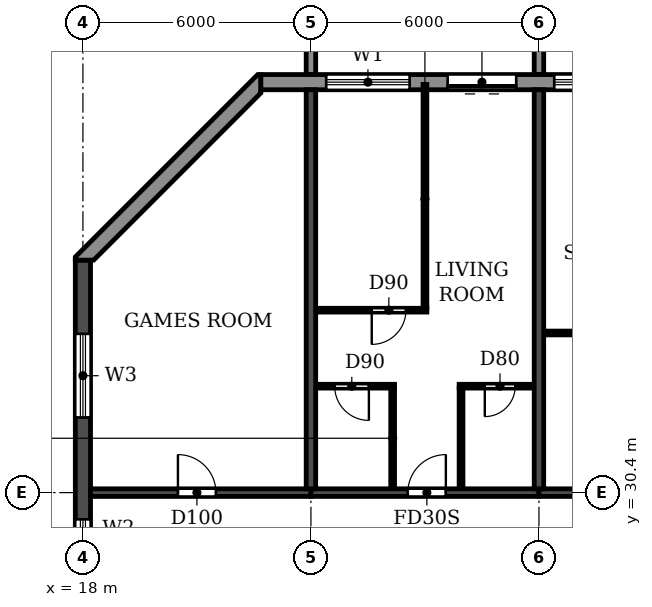
"""IFC4 building model, lengths in metres.
Left out: names, types, materials, properties, quantities, classifications, styles, units other than length and angle.
Written with IfcOpenShell. Run it as: python <this file> out.ifc"""

import sys

from ifc_helpers import new_model, si_unit, direction, frame, frame_2d, origin, place, context, subcontext, project, spatial, polyline, rectangle, outline, extrude, source, transform, mapped, element, fill, save


model = new_model("IFC4")
c1 = context("Model", 3, precision=1e-05, world=origin(), true_north=direction((0.0, 1.0)))
c2 = subcontext(c1, "Body", "Model", "MODEL_VIEW")
j1 = project(units=[si_unit("LENGTHUNIT", "METRE"), si_unit("PLANEANGLEUNIT", "RADIAN")], contexts=[c1])
p1 = place(None, origin())
s1 = spatial("IfcSite", under=j1, at=p1, CompositionType="ELEMENT")
p2 = place(p1, origin())
s2 = spatial("IfcBuilding", under=s1, at=p2, CompositionType="ELEMENT")
p3 = place(p2, frame((0.0, 0.0, 201.6)))
s3 = spatial("IfcBuildingStorey", under=s2, at=p3, CompositionType="ELEMENT", Elevation=201.6)
for number, where, z_axis, x_axis in (
    (1, (24.0, 30.5, 0.0), (0.0, 0.0, 1.0), (0.0, 1.0, 0.0)),
    (2, (30.0, 30.5, 0.0), (0.0, 0.0, 1.0), (0.0, 1.0, 0.0)),
):
    element("IfcWall", number, at=place(p3, frame(where, z_axis=z_axis, x_axis=x_axis)), inside=s3, PredefinedType="SHEAR", context=c2, shape_type="SweptSolid", body=[
        extrude(rectangle(XDim=10.5, YDim=0.25, at=frame_2d((5.25, 0.0))), origin(), (0.0, 0.0, 1.0), 3.08),
    ])
p4 = place(p3, frame((18.0, 4.683, 0.0), z_axis=(0.0, 0.0, 1.0), x_axis=(0.0, 1.0, 0.0)))
e3 = element("IfcWall", 3, at=p4, inside=s3, PredefinedType="SHEAR", context=c2, shape_type="SweptSolid", body=[
    extrude(rectangle(XDim=31.834, YDim=0.4, at=frame_2d((15.917, 0.0))), origin(), (0.0, 0.0, 1.0), 3.08),
])
p5 = place(p4, frame((23.817, 0.0, 0.9)))
e4 = element("IfcOpeningElement", 4, at=p5, cuts=e3, PredefinedType="OPENING", context=c2, shape_type="SweptSolid", body=[
    extrude(rectangle(XDim=1.2, YDim=1.5, at=frame_2d((0.6, 0.75))), frame((0.0, 0.21, 0.0), z_axis=(0.0, -1.0, 0.0), x_axis=(1.0, 0.0, 0.0)), (0.0, 0.0, 1.0), 0.42),
])
p6 = place(p4, frame((8.017, 0.0, 0.9)))
e5 = element("IfcOpeningElement", 5, at=p6, cuts=e3, PredefinedType="OPENING", context=c2, shape_type="SweptSolid", body=[
    extrude(rectangle(XDim=1.2, YDim=1.5, at=frame_2d((0.6, 0.75))), frame((0.0, 0.21, 0.0), z_axis=(0.0, -1.0, 0.0), x_axis=(1.0, 0.0, 0.0)), (0.0, 0.0, 1.0), 0.42),
])
p7 = place(p4, frame((27.694, 0.0, 0.6)))
e6 = element("IfcOpeningElement", 6, at=p7, cuts=e3, PredefinedType="OPENING", context=c2, shape_type="SweptSolid", body=[
    extrude(rectangle(XDim=2.2, YDim=1.8, at=frame_2d((1.1, 0.9))), frame((0.0, 0.21, 0.0), z_axis=(0.0, -1.0, 0.0), x_axis=(1.0, 0.0, 0.0)), (0.0, 0.0, 1.0), 0.42),
])
p8 = place(p4, frame((2.541, 0.0, 0.6)))
e7 = element("IfcOpeningElement", 7, at=p8, cuts=e3, PredefinedType="OPENING", context=c2, shape_type="SweptSolid", body=[
    extrude(rectangle(XDim=2.2, YDim=1.8, at=frame_2d((1.1, 0.9))), frame((0.0, 0.21, 0.0), z_axis=(0.0, -1.0, 0.0), x_axis=(1.0, 0.0, 0.0)), (0.0, 0.0, 1.0), 0.42),
])
p9 = place(p4, frame((15.917, 0.0, 0.9)))
e8 = element("IfcOpeningElement", 8, at=p9, cuts=e3, PredefinedType="OPENING", context=c2, shape_type="SweptSolid", body=[
    extrude(rectangle(XDim=1.2, YDim=1.5, at=frame_2d((0.6, 0.75))), frame((0.0, 0.21, 0.0), z_axis=(0.0, -1.0, 0.0), x_axis=(1.0, 0.0, 0.0)), (0.0, 0.0, 1.0), 0.42),
])
p10 = place(p3, frame((18.2, 30.4, 0.0), z_axis=(0.0, 0.0, 1.0), x_axis=(1.0, 0.0, 0.0)))
e9 = element("IfcWall", 9, at=p10, inside=s3, PredefinedType="SHEAR", context=c2, shape_type="SweptSolid", body=[
    extrude(rectangle(XDim=5.8, YDim=0.2, at=frame_2d((2.9, 0.0))), origin(), (0.0, 0.0, 1.0), 2.48),
])
p11 = place(p10, frame((2.3, 0.0, 0.0)))
e10 = element("IfcOpeningElement", 10, at=p11, cuts=e9, PredefinedType="OPENING", context=c2, shape_type="SweptSolid", body=[
    extrude(rectangle(XDim=1.0, YDim=2.1, at=frame_2d((0.5, 1.05))), frame((0.0, 0.11, 0.0), z_axis=(0.0, -1.0, 0.0), x_axis=(1.0, 0.0, 0.0)), (0.0, 0.0, 1.0), 0.22),
])
p12 = place(p3, frame((24.0, 30.4, 0.0), z_axis=(0.0, 0.0, 1.0), x_axis=(1.0, 0.0, 0.0)))
e11 = element("IfcWall", 11, at=p12, inside=s3, PredefinedType="SHEAR", context=c2, shape_type="SweptSolid", body=[
    extrude(rectangle(XDim=6.0, YDim=0.2, at=frame_2d((3.0, 0.0))), origin(), (0.0, 0.0, 1.0), 2.48),
])
p13 = place(p12, frame((2.55, 0.0, 0.0)))
e12 = element("IfcOpeningElement", 12, at=p13, cuts=e11, PredefinedType="OPENING", context=c2, shape_type="SweptSolid", body=[
    extrude(rectangle(XDim=1.0, YDim=2.1, at=frame_2d((0.5, 1.05))), frame((0.0, 0.11, 0.0), z_axis=(0.0, -1.0, 0.0), x_axis=(1.0, 0.0, 0.0)), (0.0, 0.0, 1.0), 0.22),
])
p14 = place(p3, frame((30.0, 30.4, 0.0), z_axis=(0.0, 0.0, 1.0), x_axis=(1.0, 0.0, 0.0)))
e13 = element("IfcWall", 13, at=p14, inside=s3, PredefinedType="SHEAR", context=c2, shape_type="SweptSolid", body=[
    extrude(rectangle(XDim=6.0, YDim=0.2, at=frame_2d((3.0, 0.0))), origin(), (0.0, 0.0, 1.0), 2.48),
])
p15 = place(p14, frame((2.45, 0.0, 0.0)))
e14 = element("IfcOpeningElement", 14, at=p15, cuts=e13, PredefinedType="OPENING", context=c2, shape_type="SweptSolid", body=[
    extrude(rectangle(XDim=1.0, YDim=2.1, at=frame_2d((0.5, 1.05))), frame((0.0, 0.11, 0.0), z_axis=(0.0, -1.0, 0.0), x_axis=(1.0, 0.0, 0.0)), (0.0, 0.0, 1.0), 0.22),
])
p16 = place(p3, frame((79.317, 41.2, 0.0), z_axis=(0.0, 0.0, 1.0), x_axis=(-1.0, 0.0, 0.0)))
e15 = element("IfcWall", 15, at=p16, inside=s3, PredefinedType="STANDARD", context=c2, shape_type="SweptSolid", body=[
    extrude(rectangle(XDim=56.634, YDim=0.4, at=frame_2d((28.317, 0.0))), origin(), (0.0, 0.0, 1.0), 3.08),
])
p17 = place(p16, frame((52.717, 0.0, 0.9)))
e16 = element("IfcOpeningElement", 16, at=p17, cuts=e15, PredefinedType="OPENING", context=c2, shape_type="SweptSolid", body=[
    extrude(rectangle(XDim=2.2, YDim=1.5, at=frame_2d((1.1, 0.75))), frame((0.0, 0.21, 0.0), z_axis=(0.0, -1.0, 0.0), x_axis=(1.0, 0.0, 0.0)), (0.0, 0.0, 1.0), 0.42),
])
p18 = place(p16, frame((49.917, 0.0, 0.0)))
e17 = element("IfcOpeningElement", 17, at=p18, cuts=e15, PredefinedType="OPENING", context=c2, shape_type="SweptSolid", body=[
    extrude(rectangle(XDim=1.8, YDim=2.4, at=frame_2d((0.9, 1.2))), frame((0.0, 0.21, 0.0), z_axis=(0.0, -1.0, 0.0), x_axis=(1.0, 0.0, 0.0)), (0.0, 0.0, 1.0), 0.42),
])
p19 = place(p16, frame((46.717, 0.0, 0.9)))
e18 = element("IfcOpeningElement", 18, at=p19, cuts=e15, PredefinedType="OPENING", context=c2, shape_type="SweptSolid", body=[
    extrude(rectangle(XDim=2.2, YDim=1.5, at=frame_2d((1.1, 0.75))), frame((0.0, 0.21, 0.0), z_axis=(0.0, -1.0, 0.0), x_axis=(1.0, 0.0, 0.0)), (0.0, 0.0, 1.0), 0.42),
])
p20 = place(p16, frame((43.917, 0.0, 0.0)))
e19 = element("IfcOpeningElement", 19, at=p20, cuts=e15, PredefinedType="OPENING", context=c2, shape_type="SweptSolid", body=[
    extrude(rectangle(XDim=1.8, YDim=2.4, at=frame_2d((0.9, 1.2))), frame((0.0, 0.21, 0.0), z_axis=(0.0, -1.0, 0.0), x_axis=(1.0, 0.0, 0.0)), (0.0, 0.0, 1.0), 0.42),
])
p21 = place(p16, frame((40.917, 0.0, 0.0)))
e20 = element("IfcOpeningElement", 20, at=p21, cuts=e15, PredefinedType="OPENING", context=c2, shape_type="SweptSolid", body=[
    extrude(rectangle(XDim=1.8, YDim=2.4, at=frame_2d((0.9, 1.2))), frame((0.0, 0.21, 0.0), z_axis=(0.0, -1.0, 0.0), x_axis=(1.0, 0.0, 0.0)), (0.0, 0.0, 1.0), 0.42),
])
p22 = place(p16, frame((37.717, 0.0, 0.9)))
e21 = element("IfcOpeningElement", 21, at=p22, cuts=e15, PredefinedType="OPENING", context=c2, shape_type="SweptSolid", body=[
    extrude(rectangle(XDim=2.2, YDim=1.5, at=frame_2d((1.1, 0.75))), frame((0.0, 0.21, 0.0), z_axis=(0.0, -1.0, 0.0), x_axis=(1.0, 0.0, 0.0)), (0.0, 0.0, 1.0), 0.42),
])
p23 = place(p16, frame((34.717, 0.0, 0.9)))
e22 = element("IfcOpeningElement", 22, at=p23, cuts=e15, PredefinedType="OPENING", context=c2, shape_type="SweptSolid", body=[
    extrude(rectangle(XDim=2.2, YDim=1.5, at=frame_2d((1.1, 0.75))), frame((0.0, 0.21, 0.0), z_axis=(0.0, -1.0, 0.0), x_axis=(1.0, 0.0, 0.0)), (0.0, 0.0, 1.0), 0.42),
])
p24 = place(p16, frame((31.717, 0.0, 0.9)))
e23 = element("IfcOpeningElement", 23, at=p24, cuts=e15, PredefinedType="OPENING", context=c2, shape_type="SweptSolid", body=[
    extrude(rectangle(XDim=2.2, YDim=1.5, at=frame_2d((1.1, 0.75))), frame((0.0, 0.21, 0.0), z_axis=(0.0, -1.0, 0.0), x_axis=(1.0, 0.0, 0.0)), (0.0, 0.0, 1.0), 0.42),
])
p25 = place(p16, frame((28.717, 0.0, 0.9)))
e24 = element("IfcOpeningElement", 24, at=p25, cuts=e15, PredefinedType="OPENING", context=c2, shape_type="SweptSolid", body=[
    extrude(rectangle(XDim=2.2, YDim=1.5, at=frame_2d((1.1, 0.75))), frame((0.0, 0.21, 0.0), z_axis=(0.0, -1.0, 0.0), x_axis=(1.0, 0.0, 0.0)), (0.0, 0.0, 1.0), 0.42),
])
p26 = place(p16, frame((25.917, 0.0, 0.0)))
e25 = element("IfcOpeningElement", 25, at=p26, cuts=e15, PredefinedType="OPENING", context=c2, shape_type="SweptSolid", body=[
    extrude(rectangle(XDim=1.8, YDim=2.4, at=frame_2d((0.9, 1.2))), frame((0.0, 0.21, 0.0), z_axis=(0.0, -1.0, 0.0), x_axis=(1.0, 0.0, 0.0)), (0.0, 0.0, 1.0), 0.42),
])
p27 = place(p16, frame((22.717, 0.0, 0.9)))
e26 = element("IfcOpeningElement", 26, at=p27, cuts=e15, PredefinedType="OPENING", context=c2, shape_type="SweptSolid", body=[
    extrude(rectangle(XDim=2.2, YDim=1.5, at=frame_2d((1.1, 0.75))), frame((0.0, 0.21, 0.0), z_axis=(0.0, -1.0, 0.0), x_axis=(1.0, 0.0, 0.0)), (0.0, 0.0, 1.0), 0.42),
])
p28 = place(p16, frame((19.717, 0.0, 0.9)))
e27 = element("IfcOpeningElement", 27, at=p28, cuts=e15, PredefinedType="OPENING", context=c2, shape_type="SweptSolid", body=[
    extrude(rectangle(XDim=2.2, YDim=1.5, at=frame_2d((1.1, 0.75))), frame((0.0, 0.21, 0.0), z_axis=(0.0, -1.0, 0.0), x_axis=(1.0, 0.0, 0.0)), (0.0, 0.0, 1.0), 0.42),
])
p29 = place(p16, frame((16.917, 0.0, 0.0)))
e28 = element("IfcOpeningElement", 28, at=p29, cuts=e15, PredefinedType="OPENING", context=c2, shape_type="SweptSolid", body=[
    extrude(rectangle(XDim=1.8, YDim=2.4, at=frame_2d((0.9, 1.2))), frame((0.0, 0.21, 0.0), z_axis=(0.0, -1.0, 0.0), x_axis=(1.0, 0.0, 0.0)), (0.0, 0.0, 1.0), 0.42),
])
p30 = place(p16, frame((13.717, 0.0, 0.9)))
e29 = element("IfcOpeningElement", 29, at=p30, cuts=e15, PredefinedType="OPENING", context=c2, shape_type="SweptSolid", body=[
    extrude(rectangle(XDim=2.2, YDim=1.5, at=frame_2d((1.1, 0.75))), frame((0.0, 0.21, 0.0), z_axis=(0.0, -1.0, 0.0), x_axis=(1.0, 0.0, 0.0)), (0.0, 0.0, 1.0), 0.42),
])
p31 = place(p16, frame((10.717, 0.0, 0.9)))
e30 = element("IfcOpeningElement", 30, at=p31, cuts=e15, PredefinedType="OPENING", context=c2, shape_type="SweptSolid", body=[
    extrude(rectangle(XDim=2.2, YDim=1.5, at=frame_2d((1.1, 0.75))), frame((0.0, 0.21, 0.0), z_axis=(0.0, -1.0, 0.0), x_axis=(1.0, 0.0, 0.0)), (0.0, 0.0, 1.0), 0.42),
])
p32 = place(p16, frame((7.717, 0.0, 0.9)))
e31 = element("IfcOpeningElement", 31, at=p32, cuts=e15, PredefinedType="OPENING", context=c2, shape_type="SweptSolid", body=[
    extrude(rectangle(XDim=2.2, YDim=1.5, at=frame_2d((1.1, 0.75))), frame((0.0, 0.21, 0.0), z_axis=(0.0, -1.0, 0.0), x_axis=(1.0, 0.0, 0.0)), (0.0, 0.0, 1.0), 0.42),
])
p33 = place(p16, frame((4.917, 0.0, 0.0)))
e32 = element("IfcOpeningElement", 32, at=p33, cuts=e15, PredefinedType="OPENING", context=c2, shape_type="SweptSolid", body=[
    extrude(rectangle(XDim=1.8, YDim=2.4, at=frame_2d((0.9, 1.2))), frame((0.0, 0.21, 0.0), z_axis=(0.0, -1.0, 0.0), x_axis=(1.0, 0.0, 0.0)), (0.0, 0.0, 1.0), 0.42),
])
p34 = place(p16, frame((1.717, 0.0, 0.9)))
e33 = element("IfcOpeningElement", 33, at=p34, cuts=e15, PredefinedType="OPENING", context=c2, shape_type="SweptSolid", body=[
    extrude(rectangle(XDim=2.2, YDim=1.5, at=frame_2d((1.1, 0.75))), frame((0.0, 0.21, 0.0), z_axis=(0.0, -1.0, 0.0), x_axis=(1.0, 0.0, 0.0)), (0.0, 0.0, 1.0), 0.42),
])
p35 = place(p3, origin())
e34 = element("IfcWall", 34, at=p35, inside=s3, PredefinedType="STANDARD", context=c2, shape_type="SweptSolid", body=[
    extrude(outline(polyline([(22.683, 41.4), (22.6, 41.4), (17.8, 36.6), (17.8, 36.517), (18.283, 36.517), (22.683, 40.917), (22.683, 41.4)])), origin(), (0.0, 0.0, 1.0), 3.08),
])
m1 = source(origin(), c2, "Body", "SweptSolid", [
    extrude(outline(polyline([(0.0, 0.0), (0.25, 0.0), (0.25, 3.1), (0.0, 3.1), (0.0, 0.0)])), origin(), (0.0, 0.0, 1.0), 3.1),
])
for number, where in (
    (35, (23.875, 41.4, 0.0)),
    (36, (29.875, 41.4, 0.0)),
):
    element("IfcWall", number, at=place(p3, frame(where)), inside=s3, PredefinedType="STANDARD", context=c2, shape_type="MappedRepresentation", body=[
        mapped(m1, transform((0.0, 0.0, 0.0))),
    ])
p36 = place(p3, frame((24.135, 33.2, 0.0), z_axis=(0.0, 0.0, 1.0), x_axis=(1.0, 0.0, 0.0)))
e37 = element("IfcWall", 37, at=p36, inside=s3, PredefinedType="PARTITIONING", context=c2, shape_type="SweptSolid", body=[
    extrude(rectangle(XDim=2.065, YDim=0.1, at=frame_2d((1.032, 0.0))), origin(), (0.0, 0.0, 1.0), 3.08),
])
p37 = place(p36, frame((0.49, 0.0, 0.0)))
e38 = element("IfcOpeningElement", 38, at=p37, cuts=e37, PredefinedType="OPENING", context=c2, shape_type="SweptSolid", body=[
    extrude(rectangle(XDim=0.9, YDim=2.1, at=frame_2d((0.45, 1.05))), frame((0.0, 0.06, 0.0), z_axis=(0.0, -1.0, 0.0), x_axis=(1.0, 0.0, 0.0)), (0.0, 0.0, 1.0), 0.12),
])
p38 = place(p3, frame((27.9, 33.2, 0.0), z_axis=(0.0, 0.0, 1.0), x_axis=(1.0, 0.0, 0.0)))
e39 = element("IfcWall", 39, at=p38, inside=s3, PredefinedType="PARTITIONING", context=c2, shape_type="SweptSolid", body=[
    extrude(rectangle(XDim=1.965, YDim=0.1, at=frame_2d((0.982, 0.0))), origin(), (0.0, 0.0, 1.0), 3.08),
])
p39 = place(p38, frame((0.675, 0.0, 0.0)))
e40 = element("IfcOpeningElement", 40, at=p39, cuts=e39, PredefinedType="OPENING", context=c2, shape_type="SweptSolid", body=[
    extrude(rectangle(XDim=0.8, YDim=2.1, at=frame_2d((0.4, 1.05))), frame((0.0, 0.06, 0.0), z_axis=(0.0, -1.0, 0.0), x_axis=(1.0, 0.0, 0.0)), (0.0, 0.0, 1.0), 0.12),
])
p40 = place(p3, frame((30.135, 34.6, 0.0), z_axis=(0.0, 0.0, 1.0), x_axis=(1.0, 0.0, 0.0)))
e41 = element("IfcWall", 41, at=p40, inside=s3, PredefinedType="PARTITIONING", context=c2, shape_type="SweptSolid", body=[
    extrude(rectangle(XDim=1.965, YDim=0.1, at=frame_2d((0.982, 0.0))), origin(), (0.0, 0.0, 1.0), 3.08),
])
p41 = place(p3, frame((24.135, 35.2, 0.0), z_axis=(0.0, 0.0, 1.0), x_axis=(1.0, 0.0, 0.0)))
e42 = element("IfcWall", 42, at=p41, inside=s3, PredefinedType="PARTITIONING", context=c2, shape_type="SweptSolid", body=[
    extrude(rectangle(XDim=2.915, YDim=0.1, at=frame_2d((1.458, 0.0))), origin(), (0.0, 0.0, 1.0), 3.08),
])
p42 = place(p41, frame((1.465, 0.0, 0.0)))
e43 = element("IfcOpeningElement", 43, at=p42, cuts=e42, PredefinedType="OPENING", context=c2, shape_type="SweptSolid", body=[
    extrude(rectangle(XDim=0.9, YDim=2.1, at=frame_2d((0.45, 1.05))), frame((0.0, 0.06, 0.0), z_axis=(0.0, -1.0, 0.0), x_axis=(1.0, 0.0, 0.0)), (0.0, 0.0, 1.0), 0.12),
])
p43 = place(p3, frame((26.15, 30.51, 0.0), z_axis=(0.0, 0.0, 1.0), x_axis=(0.0, 1.0, 0.0)))
e44 = element("IfcWall", 44, at=p43, inside=s3, PredefinedType="PARTITIONING", context=c2, shape_type="SweptSolid", body=[
    extrude(rectangle(XDim=2.64, YDim=0.1, at=frame_2d((1.32, 0.0))), origin(), (0.0, 0.0, 1.0), 3.08),
])
p44 = place(p3, frame((27.0, 35.25, 0.0), z_axis=(0.0, 0.0, 1.0), x_axis=(0.0, 1.0, 0.0)))
e45 = element("IfcWall", 45, at=p44, inside=s3, PredefinedType="PARTITIONING", context=c2, shape_type="SweptSolid", body=[
    extrude(rectangle(XDim=5.89, YDim=0.1, at=frame_2d((2.945, 0.0))), origin(), (0.0, 0.0, 1.0), 3.08),
])
p45 = place(p3, frame((27.95, 30.51, 0.0), z_axis=(0.0, 0.0, 1.0), x_axis=(0.0, 1.0, 0.0)))
e46 = element("IfcWall", 46, at=p45, inside=s3, PredefinedType="PARTITIONING", context=c2, shape_type="SweptSolid", body=[
    extrude(rectangle(XDim=2.64, YDim=0.1, at=frame_2d((1.32, 0.0))), origin(), (0.0, 0.0, 1.0), 3.08),
])
p46 = place(p17, origin())
e47 = element("IfcWindow", 47, at=p46, inside=s3, PartitioningType="DOUBLE_PANEL_HORIZONTAL", PredefinedType="WINDOW", context=c2, shape_type="SweptSolid", body=[
    extrude(rectangle(XDim=2.2, YDim=1.5, at=frame_2d((1.1, 0.75))), frame((0.0, 0.03, 0.0), z_axis=(0.0, -1.0, 0.0), x_axis=(1.0, 0.0, 0.0)), (0.0, 0.0, 1.0), 0.06),
])
fill(e16, e47)
p47 = place(p18, origin())
e48 = element("IfcDoor", 48, at=p47, inside=s3, OperationType="DOUBLE_DOOR_SLIDING", PredefinedType="DOOR", context=c2, shape_type="SweptSolid", body=[
    extrude(rectangle(XDim=1.8, YDim=2.4, at=frame_2d((0.9, 1.2))), frame((0.0, 0.025, 0.0), z_axis=(0.0, -1.0, 0.0), x_axis=(1.0, 0.0, 0.0)), (0.0, 0.0, 1.0), 0.05),
])
fill(e17, e48)
p48 = place(p19, origin())
e49 = element("IfcWindow", 49, at=p48, inside=s3, PartitioningType="DOUBLE_PANEL_HORIZONTAL", PredefinedType="WINDOW", context=c2, shape_type="SweptSolid", body=[
    extrude(rectangle(XDim=2.2, YDim=1.5, at=frame_2d((1.1, 0.75))), frame((0.0, 0.03, 0.0), z_axis=(0.0, -1.0, 0.0), x_axis=(1.0, 0.0, 0.0)), (0.0, 0.0, 1.0), 0.06),
])
fill(e18, e49)
p49 = place(p5, origin())
e50 = element("IfcWindow", 50, at=p49, inside=s3, PartitioningType="SINGLE_PANEL", PredefinedType="WINDOW", context=c2, shape_type="SweptSolid", body=[
    extrude(rectangle(XDim=1.2, YDim=1.5, at=frame_2d((0.6, 0.75))), frame((0.0, 0.03, 0.0), z_axis=(0.0, -1.0, 0.0), x_axis=(1.0, 0.0, 0.0)), (0.0, 0.0, 1.0), 0.06),
])
fill(e4, e50)
p50 = place(p7, origin())
e51 = element("IfcWindow", 51, at=p50, inside=s3, PartitioningType="DOUBLE_PANEL_HORIZONTAL", PredefinedType="WINDOW", context=c2, shape_type="SweptSolid", body=[
    extrude(rectangle(XDim=2.2, YDim=1.8, at=frame_2d((1.1, 0.9))), frame((0.0, 0.03, 0.0), z_axis=(0.0, -1.0, 0.0), x_axis=(1.0, 0.0, 0.0)), (0.0, 0.0, 1.0), 0.06),
])
fill(e6, e51)
p51 = place(p11, origin())
e52 = element("IfcDoor", 52, at=p51, inside=s3, OperationType="SINGLE_SWING_LEFT", PredefinedType="DOOR", context=c2, shape_type="SweptSolid", body=[
    extrude(rectangle(XDim=1.0, YDim=2.1, at=frame_2d((0.5, 1.05))), frame((0.0, 0.025, 0.0), z_axis=(0.0, -1.0, 0.0), x_axis=(1.0, 0.0, 0.0)), (0.0, 0.0, 1.0), 0.05),
])
fill(e10, e52)
p52 = place(p37, frame((0.9, 0.0, 0.0), z_axis=(0.0, 0.0, 1.0), x_axis=(-1.0, 0.0, 0.0)))
e53 = element("IfcDoor", 53, at=p52, inside=s3, OperationType="SINGLE_SWING_LEFT", PredefinedType="DOOR", context=c2, shape_type="SweptSolid", body=[
    extrude(rectangle(XDim=0.9, YDim=2.1, at=frame_2d((0.45, 1.05))), frame((0.0, 0.025, 0.0), z_axis=(0.0, -1.0, 0.0), x_axis=(1.0, 0.0, 0.0)), (0.0, 0.0, 1.0), 0.05),
])
fill(e38, e53)
p53 = place(p42, frame((0.9, 0.0, 0.0), z_axis=(0.0, 0.0, 1.0), x_axis=(-1.0, 0.0, 0.0)))
e54 = element("IfcDoor", 54, at=p53, inside=s3, OperationType="SINGLE_SWING_RIGHT", PredefinedType="DOOR", context=c2, shape_type="SweptSolid", body=[
    extrude(rectangle(XDim=0.9, YDim=2.1, at=frame_2d((0.45, 1.05))), frame((0.0, 0.025, 0.0), z_axis=(0.0, -1.0, 0.0), x_axis=(1.0, 0.0, 0.0)), (0.0, 0.0, 1.0), 0.05),
])
fill(e43, e54)
p54 = place(p13, origin())
e55 = element("IfcDoor", 55, at=p54, inside=s3, OperationType="SINGLE_SWING_RIGHT", PredefinedType="DOOR", context=c2, shape_type="SweptSolid", body=[
    extrude(rectangle(XDim=1.0, YDim=2.1, at=frame_2d((0.5, 1.05))), frame((0.0, 0.025, 0.0), z_axis=(0.0, -1.0, 0.0), x_axis=(1.0, 0.0, 0.0)), (0.0, 0.0, 1.0), 0.05),
])
fill(e12, e55)
p55 = place(p39, frame((0.8, 0.0, 0.0), z_axis=(0.0, 0.0, 1.0), x_axis=(-1.0, 0.0, 0.0)))
e56 = element("IfcDoor", 56, at=p55, inside=s3, OperationType="SINGLE_SWING_RIGHT", PredefinedType="DOOR", context=c2, shape_type="SweptSolid", body=[
    extrude(rectangle(XDim=0.8, YDim=2.1, at=frame_2d((0.4, 1.05))), frame((0.0, 0.025, 0.0), z_axis=(0.0, -1.0, 0.0), x_axis=(1.0, 0.0, 0.0)), (0.0, 0.0, 1.0), 0.05),
])
fill(e40, e56)
save(model, sys.argv[1])
